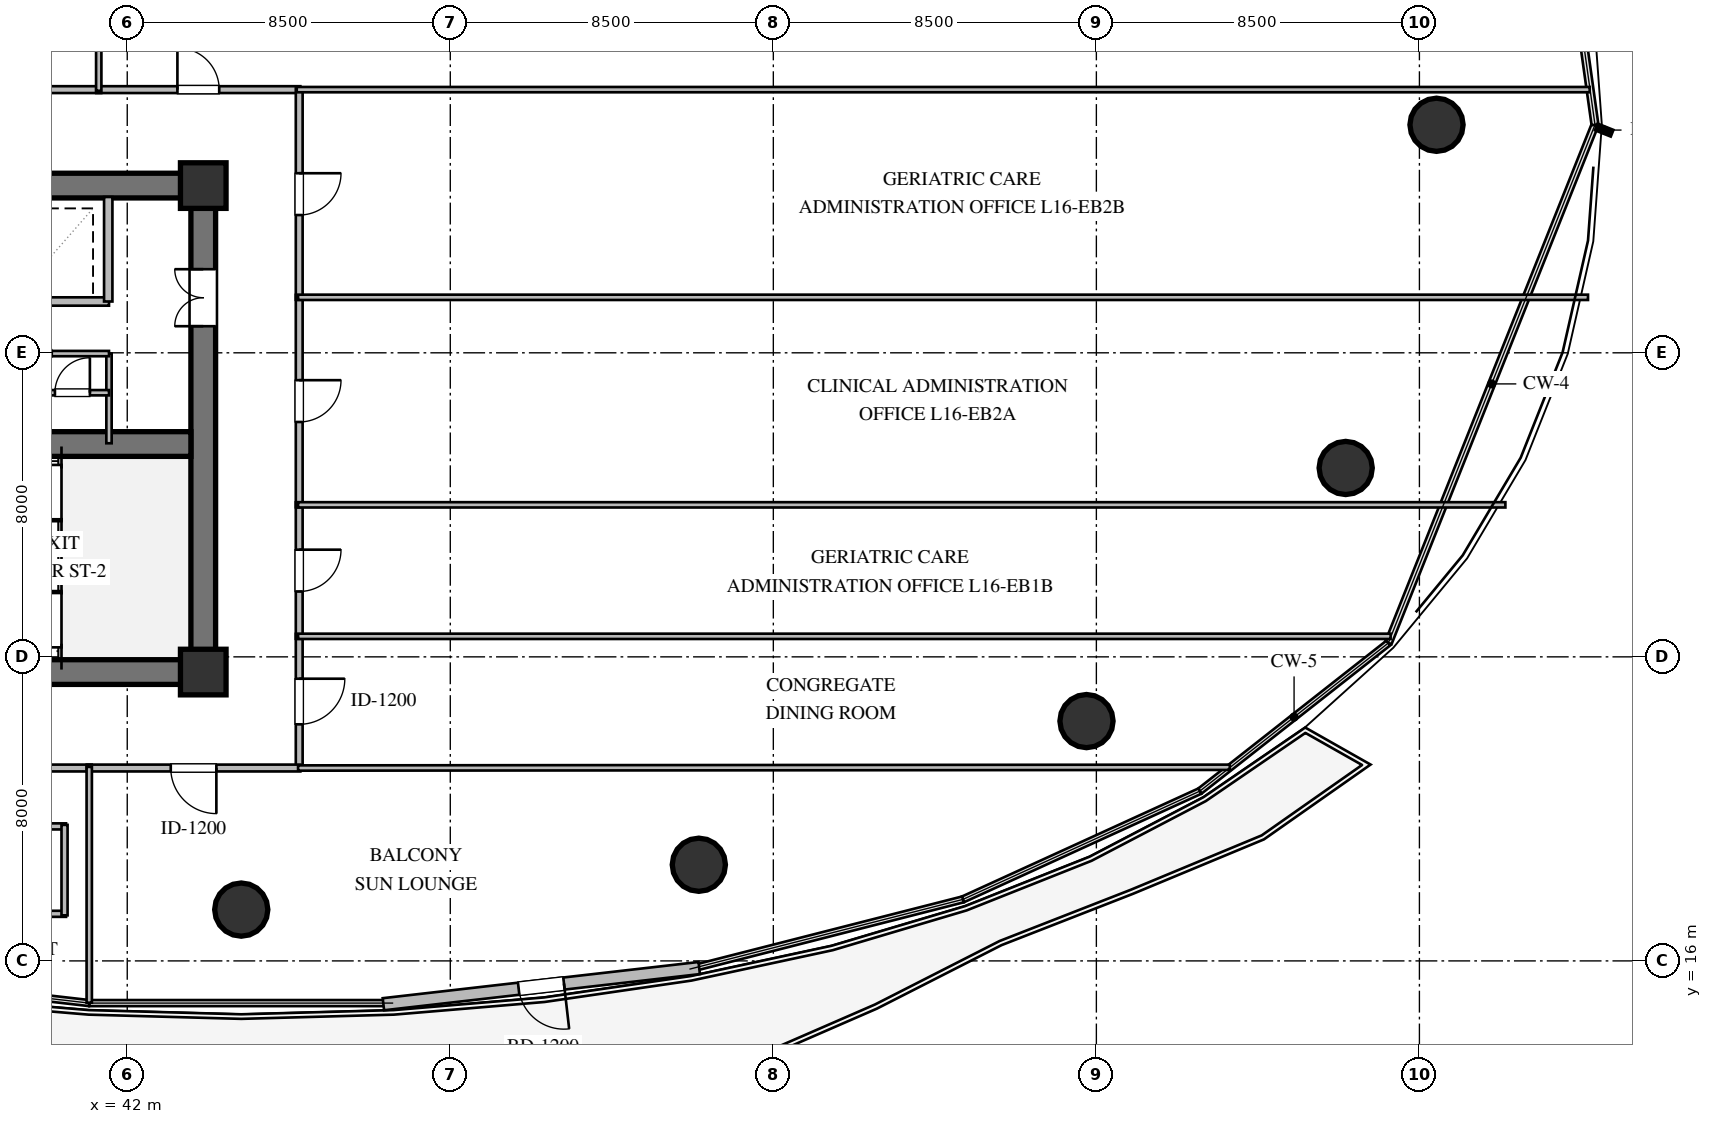
"""IFC4 building model, lengths in metres.
Left out: names, types, materials, properties, quantities, classifications, styles, units other than length and angle.
Written with IfcOpenShell. Run it as: python <this file> out.ifc"""

import sys

from ifc_helpers import new_model, si_unit, direction, frame, frame_2d, origin, origin_2d, place, context, subcontext, project, spatial, rectangle, circle, extrude, element, fill, save


model = new_model("IFC4")
c1 = context("Model", 3, precision=1e-05, world=origin(), true_north=direction((0.0, 1.0)))
c2 = subcontext(c1, "Body", "Model", "MODEL_VIEW")
j1 = project(units=[si_unit("LENGTHUNIT", "METRE"), si_unit("PLANEANGLEUNIT", "RADIAN")], contexts=[c1])
p1 = place(None, origin())
s1 = spatial("IfcSite", under=j1, at=p1, CompositionType="ELEMENT")
p2 = place(p1, origin())
s2 = spatial("IfcBuilding", under=s1, at=p2, CompositionType="ELEMENT")
p3 = place(p2, frame((0.0, 0.0, 63.6)))
s3 = spatial("IfcBuildingStorey", under=s2, at=p3, CompositionType="ELEMENT", Elevation=63.6)
for number, where, z_axis, x_axis in (
    (1, (21.675, 23.6, 0.0), (0.0, 0.0, 1.0), (1.0, 0.0, 0.0)),
    (2, (21.675, 36.4, 0.0), (0.0, 0.0, 1.0), (1.0, 0.0, 0.0)),
):
    element("IfcWall", number, at=place(p3, frame(where, z_axis=z_axis, x_axis=x_axis)), inside=s3, PredefinedType="SHEAR", context=c2, shape_type="SweptSolid", body=[
        extrude(rectangle(XDim=22.65, YDim=0.65, at=frame_2d((11.325, 0.0))), origin(), (0.0, 0.0, 1.0), 3.36),
    ])
p4 = place(p3, frame((44.0, 23.925, 0.0), z_axis=(0.0, 0.0, 1.0), x_axis=(0.0, 1.0, 0.0)))
e3 = element("IfcWall", 3, at=p4, inside=s3, PredefinedType="SHEAR", context=c2, shape_type="SweptSolid", body=[
    extrude(rectangle(XDim=12.15, YDim=0.65, at=frame_2d((6.075, 0.0))), origin(), (0.0, 0.0, 1.0), 3.36),
])
p5 = place(p4, frame((8.775, 0.0, 0.0)))
e4 = element("IfcOpeningElement", 4, at=p5, cuts=e3, PredefinedType="OPENING", context=c2, shape_type="SweptSolid", body=[
    extrude(rectangle(XDim=1.5, YDim=2.15, at=frame_2d((0.75, 1.075))), frame((0.0, 0.335, 0.0), z_axis=(0.0, -1.0, 0.0), x_axis=(1.0, 0.0, 0.0)), (0.0, 0.0, 1.0), 0.67),
])
p6 = place(p3, frame((22.325, 29.6, 0.0), z_axis=(0.0, 0.0, 1.0), x_axis=(1.0, 0.0, 0.0)))
e5 = element("IfcWall", 5, at=p6, inside=s3, PredefinedType="SHEAR", context=c2, shape_type="SweptSolid", body=[
    extrude(rectangle(XDim=21.35, YDim=0.65, at=frame_2d((10.675, 0.0))), origin(), (0.0, 0.0, 1.0), 3.36),
])
p7 = place(p6, frame((12.125, 0.0, 0.0)))
e6 = element("IfcOpeningElement", 6, at=p7, cuts=e5, PredefinedType="OPENING", context=c2, shape_type="SweptSolid", body=[
    extrude(rectangle(XDim=1.15, YDim=2.1, at=frame_2d((0.575, 1.05))), frame((0.0, 0.335, 0.0), z_axis=(0.0, -1.0, 0.0), x_axis=(1.0, 0.0, 0.0)), (0.0, 0.0, 1.0), 0.67),
])
for number, where, z_axis, x_axis in (
    (7, (44.0, 23.6, 0.0), (0.0, 0.0, 1.0), (1.0, 0.0, 0.0)),
    (8, (44.0, 36.4, 0.0), (0.0, 0.0, 1.0), (1.0, 0.0, 0.0)),
):
    element("IfcColumn", number, at=place(p3, frame(where, z_axis=z_axis, x_axis=x_axis)), inside=s3, PredefinedType="COLUMN", context=c2, shape_type="SweptSolid", body=[
        extrude(rectangle(XDim=1.2, YDim=1.2, at=origin_2d()), origin(), (0.0, 0.0, 1.0), 3.6),
    ])
for number, where, z_axis, x_axis in (
    (9, (76.45, 38.0, 0.0), (0.0, 0.0, 1.0), (1.0, 0.0, 0.0)),
    (10, (45.0, 17.35, 0.0), (0.0, 0.0, 1.0), (1.0, 0.0, 0.0)),
    (11, (57.04, 18.53, 0.0), (0.0, 0.0, 1.0), (1.0, 0.0, 0.0)),
    (12, (67.24, 22.31, 0.0), (0.0, 0.0, 1.0), (1.0, 0.0, 0.0)),
    (13, (74.06, 28.97, 0.0), (0.0, 0.0, 1.0), (1.0, 0.0, 0.0)),
):
    element("IfcColumn", number, at=place(p3, frame(where, z_axis=z_axis, x_axis=x_axis)), inside=s3, PredefinedType="COLUMN", context=c2, shape_type="SweptSolid", body=[
        extrude(circle(Radius=0.7, at=origin_2d()), origin(), (0.0, 0.0, 1.0), 3.6),
    ])
p8 = place(p3, frame((57.05, 15.812, 0.0), z_axis=(0.0, 0.0, 1.0), x_axis=(-0.993503192468, -0.113804246649, 0.0)))
e14 = element("IfcWall", 14, at=p8, inside=s3, PredefinedType="STANDARD", context=c2, shape_type="SweptSolid", body=[
    extrude(rectangle(XDim=8.365, YDim=0.32, at=frame_2d((4.182, 0.0))), origin(), (0.0, 0.0, 1.0), 3.36),
])
p9 = place(p8, frame((3.582, 0.0, 0.0)))
e15 = element("IfcOpeningElement", 15, at=p9, cuts=e14, PredefinedType="OPENING", context=c2, shape_type="SweptSolid", body=[
    extrude(rectangle(XDim=1.2, YDim=2.15, at=frame_2d((0.6, 1.075))), frame((0.0, 0.17, 0.0), z_axis=(0.0, -1.0, 0.0), x_axis=(1.0, 0.0, 0.0)), (0.0, 0.0, 1.0), 0.34),
])
p10 = place(p3, frame((33.98, 33.35, 0.0), z_axis=(0.0, 0.0, 1.0), x_axis=(1.0, 0.0, 0.0)))
e16 = element("IfcWall", 16, at=p10, inside=s3, PredefinedType="SOLIDWALL", context=c2, shape_type="SweptSolid", body=[
    extrude(rectangle(XDim=7.54, YDim=0.22, at=frame_2d((3.77, 0.0))), origin(), (0.0, 0.0, 1.0), 3.36),
])
p11 = place(p3, frame((41.5, 33.35, 0.0), z_axis=(0.0, 0.0, 1.0), x_axis=(0.0, 1.0, 0.0)))
e17 = element("IfcWall", 17, at=p11, inside=s3, PredefinedType="SOLIDWALL", context=c2, shape_type="SweptSolid", body=[
    extrude(rectangle(XDim=2.75, YDim=0.22, at=frame_2d((1.375, 0.0))), origin(), (0.0, 0.0, 1.0), 3.36),
])
p12 = place(p3, frame((41.52, 29.62, 0.0), z_axis=(0.0, 0.0, 1.0), x_axis=(0.0, 1.0, 0.0)))
e18 = element("IfcWall", 18, at=p12, inside=s3, PredefinedType="PARTITIONING", context=c2, shape_type="SweptSolid", body=[
    extrude(rectangle(XDim=2.36, YDim=0.14, at=frame_2d((1.18, 0.0))), origin(), (0.0, 0.0, 1.0), 3.36),
])
p13 = place(p3, frame((38.48, 30.95, 0.0), z_axis=(0.0, 0.0, 1.0), x_axis=(1.0, 0.0, 0.0)))
e19 = element("IfcWall", 19, at=p13, inside=s3, PredefinedType="PARTITIONING", context=c2, shape_type="SweptSolid", body=[
    extrude(rectangle(XDim=3.04, YDim=0.14, at=frame_2d((1.52, 0.0))), origin(), (0.0, 0.0, 1.0), 3.36),
])
p14 = place(p13, frame((1.617, 0.0, 0.0)))
e20 = element("IfcOpeningElement", 20, at=p14, cuts=e19, PredefinedType="OPENING", context=c2, shape_type="SweptSolid", body=[
    extrude(rectangle(XDim=0.92, YDim=2.1, at=frame_2d((0.46, 1.05))), frame((0.0, 0.08, 0.0), z_axis=(0.0, -1.0, 0.0), x_axis=(1.0, 0.0, 0.0)), (0.0, 0.0, 1.0), 0.16),
])
p15 = place(p3, frame((38.48, 31.98, 0.0), z_axis=(0.0, 0.0, 1.0), x_axis=(1.0, 0.0, 0.0)))
e21 = element("IfcWall", 21, at=p15, inside=s3, PredefinedType="PARTITIONING", context=c2, shape_type="SweptSolid", body=[
    extrude(rectangle(XDim=3.04, YDim=0.14, at=frame_2d((1.52, 0.0))), origin(), (0.0, 0.0, 1.0), 3.36),
])
p16 = place(p15, frame((0.614, 0.0, 0.0)))
e22 = element("IfcOpeningElement", 22, at=p16, cuts=e21, PredefinedType="OPENING", context=c2, shape_type="SweptSolid", body=[
    extrude(rectangle(XDim=0.92, YDim=2.1, at=frame_2d((0.46, 1.05))), frame((0.0, 0.08, 0.0), z_axis=(0.0, -1.0, 0.0), x_axis=(1.0, 0.0, 0.0)), (0.0, 0.0, 1.0), 0.16),
])
p17 = place(p3, frame((38.01, 17.239, 0.0), z_axis=(0.0, 0.0, 1.0), x_axis=(1.0, 0.0, 0.0)))
e23 = element("IfcWall", 23, at=p17, inside=s3, PredefinedType="PLUMBINGWALL", context=c2, shape_type="SweptSolid", body=[
    extrude(rectangle(XDim=2.38, YDim=0.16, at=frame_2d((1.19, 0.0))), origin(), (0.0, 0.0, 1.0), 2.738),
])
p18 = place(p3, frame((38.01, 19.539, 0.0), z_axis=(0.0, 0.0, 1.0), x_axis=(1.0, 0.0, 0.0)))
e24 = element("IfcWall", 24, at=p18, inside=s3, PredefinedType="PLUMBINGWALL", context=c2, shape_type="SweptSolid", body=[
    extrude(rectangle(XDim=2.38, YDim=0.16, at=frame_2d((1.19, 0.0))), origin(), (0.0, 0.0, 1.0), 3.36),
])
p19 = place(p3, frame((40.35, 17.199, 0.0), z_axis=(0.0, 0.0, 1.0), x_axis=(0.0, 1.0, 0.0)))
e25 = element("IfcWall", 25, at=p19, inside=s3, PredefinedType="PLUMBINGWALL", context=c2, shape_type="SweptSolid", body=[
    extrude(rectangle(XDim=2.38, YDim=0.16, at=frame_2d((1.19, 0.0))), origin(), (0.0, 0.0, 1.0), 3.36),
])
p20 = place(p3, frame((37.435, 38.925, 0.0), z_axis=(0.0, 0.0, 1.0), x_axis=(1.0, 0.0, 0.0)))
e26 = element("IfcWall", 26, at=p20, inside=s3, PredefinedType="PARTITIONING", context=c2, shape_type="SweptSolid", body=[
    extrude(rectangle(XDim=3.88, YDim=0.18, at=frame_2d((1.94, 0.0))), origin(), (0.0, 0.0, 1.0), 3.36),
])
p21 = place(p20, frame((1.39, 0.0, 0.0)))
e27 = element("IfcOpeningElement", 27, at=p21, cuts=e26, PredefinedType="OPENING", context=c2, shape_type="SweptSolid", body=[
    extrude(rectangle(XDim=1.1, YDim=2.1, at=frame_2d((0.55, 1.05))), frame((0.0, 0.1, 0.0), z_axis=(0.0, -1.0, 0.0), x_axis=(1.0, 0.0, 0.0)), (0.0, 0.0, 1.0), 0.2),
])
p22 = place(p3, frame((41.185, 38.925, 0.0), z_axis=(0.0, 0.0, 1.0), x_axis=(1.0, 0.0, 0.0)))
e28 = element("IfcWall", 28, at=p22, inside=s3, PredefinedType="PARTITIONING", context=c2, shape_type="SweptSolid", body=[
    extrude(rectangle(XDim=5.37, YDim=0.18, at=frame_2d((2.685, 0.0))), origin(), (0.0, 0.0, 1.0), 3.36),
])
p23 = place(p22, frame((2.135, 0.0, 0.0)))
e29 = element("IfcOpeningElement", 29, at=p23, cuts=e28, PredefinedType="OPENING", context=c2, shape_type="SweptSolid", body=[
    extrude(rectangle(XDim=1.1, YDim=2.1, at=frame_2d((0.55, 1.05))), frame((0.0, 0.1, 0.0), z_axis=(0.0, -1.0, 0.0), x_axis=(1.0, 0.0, 0.0)), (0.0, 0.0, 1.0), 0.2),
])
p24 = place(p3, frame((46.525, 24.605, 0.0), z_axis=(0.0, 0.0, 1.0), x_axis=(0.0, -1.0, 0.0)))
e30 = element("IfcWall", 30, at=p24, inside=s3, PredefinedType="PARTITIONING", context=c2, shape_type="SweptSolid", body=[
    extrude(rectangle(XDim=3.56, YDim=0.18, at=frame_2d((1.78, 0.0))), origin(), (0.0, 0.0, 1.0), 3.36),
])
p25 = place(p24, frame((1.18, 0.0, 0.0)))
e31 = element("IfcOpeningElement", 31, at=p25, cuts=e30, PredefinedType="OPENING", context=c2, shape_type="SweptSolid", body=[
    extrude(rectangle(XDim=1.2, YDim=2.15, at=frame_2d((0.6, 1.075))), frame((0.0, 0.1, 0.0), z_axis=(0.0, -1.0, 0.0), x_axis=(1.0, 0.0, 0.0)), (0.0, 0.0, 1.0), 0.2),
])
p26 = place(p3, frame((46.525, 28.065, 0.0), z_axis=(0.0, 0.0, 1.0), x_axis=(0.0, -1.0, 0.0)))
e32 = element("IfcWall", 32, at=p26, inside=s3, PredefinedType="PARTITIONING", context=c2, shape_type="SweptSolid", body=[
    extrude(rectangle(XDim=3.59, YDim=0.18, at=frame_2d((1.795, 0.0))), origin(), (0.0, 0.0, 1.0), 3.36),
])
p27 = place(p26, frame((1.245, 0.0, 0.0)))
e33 = element("IfcOpeningElement", 33, at=p27, cuts=e32, PredefinedType="OPENING", context=c2, shape_type="SweptSolid", body=[
    extrude(rectangle(XDim=1.1, YDim=2.1, at=frame_2d((0.55, 1.05))), frame((0.0, 0.1, 0.0), z_axis=(0.0, -1.0, 0.0), x_axis=(1.0, 0.0, 0.0)), (0.0, 0.0, 1.0), 0.2),
])
p28 = place(p3, frame((46.525, 33.525, 0.0), z_axis=(0.0, 0.0, 1.0), x_axis=(0.0, -1.0, 0.0)))
e34 = element("IfcWall", 34, at=p28, inside=s3, PredefinedType="PARTITIONING", context=c2, shape_type="SweptSolid", body=[
    extrude(rectangle(XDim=5.59, YDim=0.18, at=frame_2d((2.795, 0.0))), origin(), (0.0, 0.0, 1.0), 3.36),
])
p29 = place(p28, frame((2.245, 0.0, 0.0)))
e35 = element("IfcOpeningElement", 35, at=p29, cuts=e34, PredefinedType="OPENING", context=c2, shape_type="SweptSolid", body=[
    extrude(rectangle(XDim=1.1, YDim=2.1, at=frame_2d((0.55, 1.05))), frame((0.0, 0.1, 0.0), z_axis=(0.0, -1.0, 0.0), x_axis=(1.0, 0.0, 0.0)), (0.0, 0.0, 1.0), 0.2),
])
p30 = place(p3, frame((46.525, 38.955, 0.0), z_axis=(0.0, 0.0, 1.0), x_axis=(0.0, -1.0, 0.0)))
e36 = element("IfcWall", 36, at=p30, inside=s3, PredefinedType="PARTITIONING", context=c2, shape_type="SweptSolid", body=[
    extrude(rectangle(XDim=5.56, YDim=0.18, at=frame_2d((2.78, 0.0))), origin(), (0.0, 0.0, 1.0), 3.36),
])
p31 = place(p30, frame((2.23, 0.0, 0.0)))
e37 = element("IfcOpeningElement", 37, at=p31, cuts=e36, PredefinedType="OPENING", context=c2, shape_type="SweptSolid", body=[
    extrude(rectangle(XDim=1.1, YDim=2.1, at=frame_2d((0.55, 1.05))), frame((0.0, 0.1, 0.0), z_axis=(0.0, -1.0, 0.0), x_axis=(1.0, 0.0, 0.0)), (0.0, 0.0, 1.0), 0.2),
])
p32 = place(p3, frame((41.065, 21.075, 0.0), z_axis=(0.0, 0.0, 1.0), x_axis=(-1.0, 0.0, 0.0)))
e38 = element("IfcWall", 38, at=p32, inside=s3, PredefinedType="PARTITIONING", context=c2, shape_type="SweptSolid", body=[
    extrude(rectangle(XDim=13.13, YDim=0.18, at=frame_2d((6.565, 0.0))), origin(), (0.0, 0.0, 1.0), 2.996),
])
p33 = place(p32, frame((6.015, 0.0, 0.0)))
e39 = element("IfcOpeningElement", 39, at=p33, cuts=e38, PredefinedType="OPENING", context=c2, shape_type="SweptSolid", body=[
    extrude(rectangle(XDim=1.1, YDim=2.1, at=frame_2d((0.55, 1.05))), frame((0.0, 0.1, 0.0), z_axis=(0.0, -1.0, 0.0), x_axis=(1.0, 0.0, 0.0)), (0.0, 0.0, 1.0), 0.2),
])
p34 = place(p3, frame((46.555, 21.075, 0.0), z_axis=(0.0, 0.0, 1.0), x_axis=(-1.0, 0.0, 0.0)))
e40 = element("IfcWall", 40, at=p34, inside=s3, PredefinedType="PARTITIONING", context=c2, shape_type="SweptSolid", body=[
    extrude(rectangle(XDim=5.62, YDim=0.18, at=frame_2d((2.81, 0.0))), origin(), (0.0, 0.0, 1.0), 3.36),
])
p35 = place(p34, frame((2.21, 0.0, 0.0)))
e41 = element("IfcOpeningElement", 41, at=p35, cuts=e40, PredefinedType="OPENING", context=c2, shape_type="SweptSolid", body=[
    extrude(rectangle(XDim=1.2, YDim=2.15, at=frame_2d((0.6, 1.075))), frame((0.0, 0.1, 0.0), z_axis=(0.0, -1.0, 0.0), x_axis=(1.0, 0.0, 0.0)), (0.0, 0.0, 1.0), 0.2),
])
p36 = place(p3, frame((41.25, 65.638, 0.0), z_axis=(0.0, 0.0, 1.0), x_axis=(0.0, -1.0, 0.0)))
e42 = element("IfcWall", 42, at=p36, inside=s3, PredefinedType="PARTITIONING", context=c2, shape_type="SweptSolid", body=[
    extrude(rectangle(XDim=26.743, YDim=0.14, at=frame_2d((13.372, 0.0))), origin(), (0.0, 0.0, 1.0), 3.36),
])
p37 = place(p3, frame((80.48, 38.925, 0.0), z_axis=(0.0, 0.0, 1.0), x_axis=(-1.0, 0.0, 0.0)))
e43 = element("IfcWall", 43, at=p37, inside=s3, PredefinedType="PARTITIONING", context=c2, shape_type="SweptSolid", body=[
    extrude(rectangle(XDim=34.02, YDim=0.14, at=frame_2d((17.01, 0.0))), origin(), (0.0, 0.0, 1.0), 3.36),
])
p38 = place(p3, frame((46.495, 24.54, 0.0), z_axis=(0.0, 0.0, 1.0), x_axis=(1.0, 0.0, 0.0)))
e44 = element("IfcWall", 44, at=p38, inside=s3, PredefinedType="PARTITIONING", context=c2, shape_type="SweptSolid", body=[
    extrude(rectangle(XDim=28.747, YDim=0.14, at=frame_2d((14.374, 0.0))), origin(), (0.0, 0.0, 1.0), 2.806),
])
p39 = place(p3, frame((71.011, 21.094, 0.0), z_axis=(0.0, 0.0, 1.0), x_axis=(-0.999999682646, -0.000796685534, 0.0)))
e45 = element("IfcWall", 45, at=p39, inside=s3, PredefinedType="PARTITIONING", context=c2, shape_type="SweptSolid", body=[
    extrude(rectangle(XDim=24.516, YDim=0.14, at=frame_2d((12.258, 0.0))), origin(), (0.0, 0.0, 1.0), 2.996),
])
p40 = place(p3, frame((46.495, 28.0, 0.0), z_axis=(0.0, 0.0, 1.0), x_axis=(1.0, 0.0, 0.0)))
e46 = element("IfcWall", 46, at=p40, inside=s3, PredefinedType="PARTITIONING", context=c2, shape_type="SweptSolid", body=[
    extrude(rectangle(XDim=31.767, YDim=0.14, at=frame_2d((15.883, 0.0))), origin(), (0.0, 0.0, 1.0), 2.806),
])
p41 = place(p3, frame((46.495, 33.46, 0.0), z_axis=(0.0, 0.0, 1.0), x_axis=(1.0, 0.0, 0.0)))
e47 = element("IfcWall", 47, at=p41, inside=s3, PredefinedType="PARTITIONING", context=c2, shape_type="SweptSolid", body=[
    extrude(rectangle(XDim=33.941, YDim=0.14, at=frame_2d((16.97, 0.0))), origin(), (0.0, 0.0, 1.0), 3.36),
])
p42 = place(p3, frame((41.0, 21.105, 0.0), z_axis=(0.0, 0.0, 1.0), x_axis=(0.0, -1.0, 0.0)))
e48 = element("IfcWall", 48, at=p42, inside=s3, PredefinedType="PARTITIONING", context=c2, shape_type="SweptSolid", body=[
    extrude(rectangle(XDim=6.205, YDim=0.14, at=frame_2d((3.103, 0.0))), origin(), (0.0, 0.0, 1.0), 3.36),
])
p43 = place(p9, origin())
e49 = element("IfcDoor", 49, at=p43, inside=s3, OperationType="SINGLE_SWING_LEFT", PredefinedType="DOOR", context=c2, shape_type="SweptSolid", body=[
    extrude(rectangle(XDim=1.2, YDim=2.15, at=frame_2d((0.6, 1.075))), frame((0.0, 0.025, 0.0), z_axis=(0.0, -1.0, 0.0), x_axis=(1.0, 0.0, 0.0)), (0.0, 0.0, 1.0), 0.05),
])
fill(e15, e49)
p44 = place(p5, origin())
e50 = element("IfcDoor", 50, at=p44, inside=s3, OperationType="DOUBLE_DOOR_SINGLE_SWING", PredefinedType="DOOR", context=c2, shape_type="SweptSolid", body=[
    extrude(rectangle(XDim=1.5, YDim=2.15, at=frame_2d((0.75, 1.075))), frame((0.0, 0.025, 0.0), z_axis=(0.0, -1.0, 0.0), x_axis=(1.0, 0.0, 0.0)), (0.0, 0.0, 1.0), 0.05),
])
fill(e4, e50)
p45 = place(p14, origin())
e51 = element("IfcDoor", 51, at=p45, inside=s3, OperationType="SINGLE_SWING_RIGHT", PredefinedType="DOOR", context=c2, shape_type="SweptSolid", body=[
    extrude(rectangle(XDim=0.92, YDim=2.1, at=frame_2d((0.46, 1.05))), frame((0.0, 0.025, 0.0), z_axis=(0.0, -1.0, 0.0), x_axis=(1.0, 0.0, 0.0)), (0.0, 0.0, 1.0), 0.05),
])
fill(e20, e51)
p46 = place(p23, origin())
e52 = element("IfcDoor", 52, at=p46, inside=s3, OperationType="SINGLE_SWING_LEFT", PredefinedType="DOOR", context=c2, shape_type="SweptSolid", body=[
    extrude(rectangle(XDim=1.1, YDim=2.1, at=frame_2d((0.55, 1.05))), frame((0.0, 0.025, 0.0), z_axis=(0.0, -1.0, 0.0), x_axis=(1.0, 0.0, 0.0)), (0.0, 0.0, 1.0), 0.05),
])
fill(e29, e52)
p47 = place(p25, origin())
e53 = element("IfcDoor", 53, at=p47, inside=s3, OperationType="SINGLE_SWING_LEFT", PredefinedType="DOOR", context=c2, shape_type="SweptSolid", body=[
    extrude(rectangle(XDim=1.2, YDim=2.15, at=frame_2d((0.6, 1.075))), frame((0.0, 0.025, 0.0), z_axis=(0.0, -1.0, 0.0), x_axis=(1.0, 0.0, 0.0)), (0.0, 0.0, 1.0), 0.05),
])
fill(e31, e53)
p48 = place(p27, origin())
e54 = element("IfcDoor", 54, at=p48, inside=s3, OperationType="SINGLE_SWING_LEFT", PredefinedType="DOOR", context=c2, shape_type="SweptSolid", body=[
    extrude(rectangle(XDim=1.1, YDim=2.1, at=frame_2d((0.55, 1.05))), frame((0.0, 0.025, 0.0), z_axis=(0.0, -1.0, 0.0), x_axis=(1.0, 0.0, 0.0)), (0.0, 0.0, 1.0), 0.05),
])
fill(e33, e54)
p49 = place(p29, origin())
e55 = element("IfcDoor", 55, at=p49, inside=s3, OperationType="SINGLE_SWING_LEFT", PredefinedType="DOOR", context=c2, shape_type="SweptSolid", body=[
    extrude(rectangle(XDim=1.1, YDim=2.1, at=frame_2d((0.55, 1.05))), frame((0.0, 0.025, 0.0), z_axis=(0.0, -1.0, 0.0), x_axis=(1.0, 0.0, 0.0)), (0.0, 0.0, 1.0), 0.05),
])
fill(e35, e55)
p50 = place(p31, origin())
e56 = element("IfcDoor", 56, at=p50, inside=s3, OperationType="SINGLE_SWING_LEFT", PredefinedType="DOOR", context=c2, shape_type="SweptSolid", body=[
    extrude(rectangle(XDim=1.1, YDim=2.1, at=frame_2d((0.55, 1.05))), frame((0.0, 0.025, 0.0), z_axis=(0.0, -1.0, 0.0), x_axis=(1.0, 0.0, 0.0)), (0.0, 0.0, 1.0), 0.05),
])
fill(e37, e56)
p51 = place(p35, origin())
e57 = element("IfcDoor", 57, at=p51, inside=s3, OperationType="SINGLE_SWING_LEFT", PredefinedType="DOOR", context=c2, shape_type="SweptSolid", body=[
    extrude(rectangle(XDim=1.2, YDim=2.15, at=frame_2d((0.6, 1.075))), frame((0.0, 0.025, 0.0), z_axis=(0.0, -1.0, 0.0), x_axis=(1.0, 0.0, 0.0)), (0.0, 0.0, 1.0), 0.05),
])
fill(e41, e57)
save(model, sys.argv[1])
